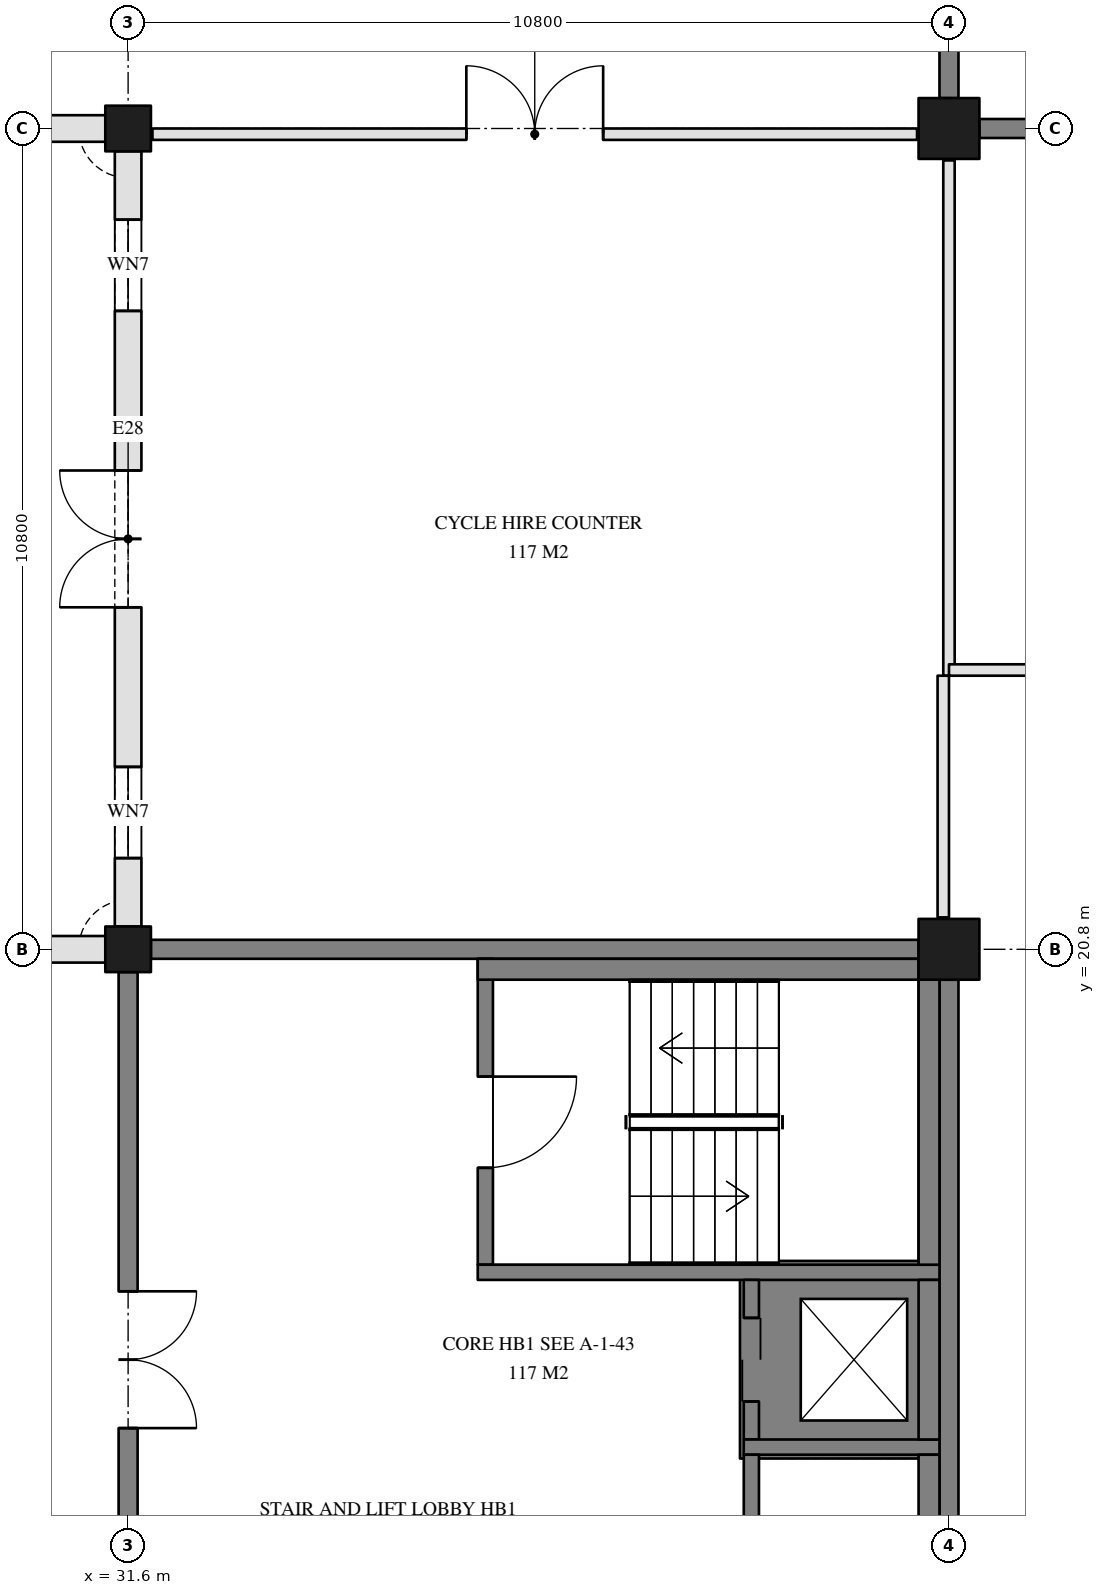
"""IFC4 building model, lengths in metres.
Left out: names, types, materials, properties, quantities, classifications, styles, units other than length and angle.
Written with IfcOpenShell. Run it as: python <this file> out.ifc"""

import sys

from ifc_helpers import new_model, si_unit, direction, frame, frame_2d, origin, origin_2d, place, context, subcontext, project, spatial, polyline, rectangle, outline, extrude, element, fill, save


model = new_model("IFC4")
c1 = context("Model", 3, precision=1e-05, world=origin(), true_north=direction((0.0, 1.0)))
c2 = subcontext(c1, "Body", "Model", "MODEL_VIEW")
j1 = project(units=[si_unit("LENGTHUNIT", "METRE"), si_unit("PLANEANGLEUNIT", "RADIAN")], contexts=[c1])
p1 = place(None, origin())
s1 = spatial("IfcSite", under=j1, at=p1, CompositionType="ELEMENT")
p2 = place(p1, origin())
s2 = spatial("IfcBuilding", under=s1, at=p2, CompositionType="ELEMENT")
p3 = place(p2, frame((0.0, 0.0, -5.4)))
s3 = spatial("IfcBuildingStorey", under=s2, at=p3, CompositionType="ELEMENT", Elevation=-5.4)
for number, where, z_axis, x_axis in (
    (1, (42.4, 20.8, -0.4), (0.0, 0.0, 1.0), (1.0, 0.0, 0.0)),
    (2, (42.4, 31.6, -0.4), (0.0, 0.0, 1.0), (1.0, 0.0, 0.0)),
):
    element("IfcColumn", number, at=place(p3, frame(where, z_axis=z_axis, x_axis=x_axis)), inside=s3, PredefinedType="COLUMN", context=c2, shape_type="SweptSolid", body=[
        extrude(rectangle(XDim=0.8, YDim=0.8, at=origin_2d()), origin(), (0.0, 0.0, 1.0), 5.8),
    ])
for number, where, z_axis, x_axis in (
    (3, (31.6, 20.8, -0.4), (0.0, 0.0, 1.0), (1.0, 0.0, 0.0)),
    (4, (31.6, 31.6, -0.4), (0.0, 0.0, 1.0), (1.0, 0.0, 0.0)),
):
    element("IfcColumn", number, at=place(p3, frame(where, z_axis=z_axis, x_axis=x_axis)), inside=s3, PredefinedType="COLUMN", context=c2, shape_type="SweptSolid", body=[
        extrude(rectangle(XDim=0.6, YDim=0.6, at=origin_2d()), origin(), (0.0, 0.0, 1.0), 5.8),
    ])
p4 = place(p3, frame((0.0, 0.0, -1.4)))
e5 = element("IfcWall", 5, at=p4, inside=s3, PredefinedType="SOLIDWALL", context=c2, shape_type="SweptSolid", body=[
    extrude(outline(polyline([(39.65, 16.7), (39.65, 14.1), (42.25, 14.1), (42.25, 16.7), (39.65, 16.7)]), holes=[polyline([(39.9, 14.35), (42.0, 14.35), (42.0, 16.45), (39.9, 16.45), (39.9, 14.35)])]), origin(), (0.0, 0.0, 1.0), 1.4),
])
p5 = place(p3, frame((42.8, 31.6, 0.0), z_axis=(0.0, 0.0, 1.0), x_axis=(1.0, 0.0, 0.0)))
e6 = element("IfcWall", 6, at=p5, inside=s3, PredefinedType="SOLIDWALL", context=c2, shape_type="SweptSolid", body=[
    extrude(rectangle(XDim=10.0, YDim=0.25, at=frame_2d((5.0, 0.0))), origin(), (0.0, 0.0, 1.0), 5.4),
])
p6 = place(p3, frame((42.4, 41.9, 0.0), z_axis=(0.0, 0.0, 1.0), x_axis=(0.0, -1.0, 0.0)))
e7 = element("IfcWall", 7, at=p6, inside=s3, PredefinedType="SOLIDWALL", context=c2, shape_type="SweptSolid", body=[
    extrude(rectangle(XDim=9.9, YDim=0.25, at=frame_2d((4.95, 0.0))), origin(), (0.0, 0.0, 1.0), 5.4),
])
p7 = place(p6, frame((6.638, 0.0, 0.0)))
e8 = element("IfcOpeningElement", 8, at=p7, cuts=e7, PredefinedType="OPENING", context=c2, shape_type="SweptSolid", body=[
    extrude(rectangle(XDim=1.8, YDim=2.1, at=frame_2d((0.9, 1.05))), frame((0.0, 0.135, 0.0), z_axis=(0.0, -1.0, 0.0), x_axis=(1.0, 0.0, 0.0)), (0.0, 0.0, 1.0), 0.27),
])
p8 = place(p3, frame((42.4, 10.4, 0.0), z_axis=(0.0, 0.0, 1.0), x_axis=(0.0, 1.0, 0.0)))
e9 = element("IfcWall", 9, at=p8, inside=s3, PredefinedType="SOLIDWALL", context=c2, shape_type="SweptSolid", body=[
    extrude(rectangle(XDim=10.0, YDim=0.25, at=frame_2d((5.0, 0.0))), origin(), (0.0, 0.0, 1.0), 5.4),
])
p9 = place(p3, frame((42.0, 20.8, 0.0), z_axis=(0.0, 0.0, 1.0), x_axis=(-1.0, 0.0, 0.0)))
e10 = element("IfcWall", 10, at=p9, inside=s3, PredefinedType="SOLIDWALL", context=c2, shape_type="SweptSolid", body=[
    extrude(rectangle(XDim=10.1, YDim=0.25, at=frame_2d((5.05, 0.0))), origin(), (0.0, 0.0, 1.0), 5.4),
])
p10 = place(p3, frame((31.6, 20.5, 0.0), z_axis=(0.0, 0.0, 1.0), x_axis=(0.0, -1.0, 0.0)))
e11 = element("IfcWall", 11, at=p10, inside=s3, PredefinedType="SOLIDWALL", context=c2, shape_type="SweptSolid", body=[
    extrude(rectangle(XDim=10.2, YDim=0.25, at=frame_2d((5.1, 0.0))), origin(), (0.0, 0.0, 1.0), 5.4),
])
p11 = place(p10, frame((4.2, 0.0, 0.0)))
e12 = element("IfcOpeningElement", 12, at=p11, cuts=e11, PredefinedType="OPENING", context=c2, shape_type="SweptSolid", body=[
    extrude(rectangle(XDim=1.8, YDim=2.1, at=frame_2d((0.9, 1.05))), frame((0.0, 0.135, 0.0), z_axis=(0.0, -1.0, 0.0), x_axis=(1.0, 0.0, 0.0)), (0.0, 0.0, 1.0), 0.27),
])
p12 = place(p3, frame((21.1, 20.8, 0.0), z_axis=(0.0, 0.0, 1.0), x_axis=(1.0, 0.0, 0.0)))
e13 = element("IfcWall", 13, at=p12, inside=s3, PredefinedType="SOLIDWALL", context=c2, shape_type="SweptSolid", body=[
    extrude(rectangle(XDim=10.2, YDim=0.35, at=frame_2d((5.1, 0.0))), origin(), (0.0, 0.0, 1.0), 3.6),
])
p13 = place(p12, frame((0.9, 0.0, 0.9)))
e14 = element("IfcOpeningElement", 14, at=p13, cuts=e13, PredefinedType="OPENING", context=c2, shape_type="SweptSolid", body=[
    extrude(rectangle(XDim=1.2, YDim=1.5, at=frame_2d((0.6, 0.75))), frame((0.0, 0.185, 0.0), z_axis=(0.0, -1.0, 0.0), x_axis=(1.0, 0.0, 0.0)), (0.0, 0.0, 1.0), 0.37),
])
p14 = place(p12, frame((4.2, 0.0, 0.0)))
e15 = element("IfcOpeningElement", 15, at=p14, cuts=e13, PredefinedType="OPENING", context=c2, shape_type="SweptSolid", body=[
    extrude(rectangle(XDim=1.8, YDim=2.4, at=frame_2d((0.9, 1.2))), frame((0.0, 0.185, 0.0), z_axis=(0.0, -1.0, 0.0), x_axis=(1.0, 0.0, 0.0)), (0.0, 0.0, 1.0), 0.37),
])
p15 = place(p12, frame((8.1, 0.0, 0.9)))
e16 = element("IfcOpeningElement", 16, at=p15, cuts=e13, PredefinedType="OPENING", context=c2, shape_type="SweptSolid", body=[
    extrude(rectangle(XDim=1.2, YDim=1.5, at=frame_2d((0.6, 0.75))), frame((0.0, 0.185, 0.0), z_axis=(0.0, -1.0, 0.0), x_axis=(1.0, 0.0, 0.0)), (0.0, 0.0, 1.0), 0.37),
])
p16 = place(p3, frame((21.1, 31.6, 0.0), z_axis=(0.0, 0.0, 1.0), x_axis=(1.0, 0.0, 0.0)))
e17 = element("IfcWall", 17, at=p16, inside=s3, PredefinedType="SOLIDWALL", context=c2, shape_type="SweptSolid", body=[
    extrude(rectangle(XDim=10.2, YDim=0.35, at=frame_2d((5.1, 0.0))), origin(), (0.0, 0.0, 1.0), 3.6),
])
p17 = place(p16, frame((0.9, 0.0, 0.9)))
e18 = element("IfcOpeningElement", 18, at=p17, cuts=e17, PredefinedType="OPENING", context=c2, shape_type="SweptSolid", body=[
    extrude(rectangle(XDim=1.2, YDim=1.5, at=frame_2d((0.6, 0.75))), frame((0.0, 0.185, 0.0), z_axis=(0.0, -1.0, 0.0), x_axis=(1.0, 0.0, 0.0)), (0.0, 0.0, 1.0), 0.37),
])
p18 = place(p16, frame((4.2, 0.0, 0.0)))
e19 = element("IfcOpeningElement", 19, at=p18, cuts=e17, PredefinedType="OPENING", context=c2, shape_type="SweptSolid", body=[
    extrude(rectangle(XDim=1.8, YDim=2.4, at=frame_2d((0.9, 1.2))), frame((0.0, 0.185, 0.0), z_axis=(0.0, -1.0, 0.0), x_axis=(1.0, 0.0, 0.0)), (0.0, 0.0, 1.0), 0.37),
])
p19 = place(p16, frame((8.1, 0.0, 0.9)))
e20 = element("IfcOpeningElement", 20, at=p19, cuts=e17, PredefinedType="OPENING", context=c2, shape_type="SweptSolid", body=[
    extrude(rectangle(XDim=1.2, YDim=1.5, at=frame_2d((0.6, 0.75))), frame((0.0, 0.185, 0.0), z_axis=(0.0, -1.0, 0.0), x_axis=(1.0, 0.0, 0.0)), (0.0, 0.0, 1.0), 0.37),
])
p20 = place(p3, frame((31.6, 21.1, 0.0), z_axis=(0.0, 0.0, 1.0), x_axis=(0.0, 1.0, 0.0)))
e21 = element("IfcWall", 21, at=p20, inside=s3, PredefinedType="SOLIDWALL", context=c2, shape_type="SweptSolid", body=[
    extrude(rectangle(XDim=10.2, YDim=0.35, at=frame_2d((5.1, 0.0))), origin(), (0.0, 0.0, 1.0), 3.6),
])
p21 = place(p20, frame((0.9, 0.0, 0.9)))
e22 = element("IfcOpeningElement", 22, at=p21, cuts=e21, PredefinedType="OPENING", context=c2, shape_type="SweptSolid", body=[
    extrude(rectangle(XDim=1.2, YDim=1.5, at=frame_2d((0.6, 0.75))), frame((0.0, 0.185, 0.0), z_axis=(0.0, -1.0, 0.0), x_axis=(1.0, 0.0, 0.0)), (0.0, 0.0, 1.0), 0.37),
])
p22 = place(p20, frame((4.2, 0.0, 0.0)))
e23 = element("IfcOpeningElement", 23, at=p22, cuts=e21, PredefinedType="OPENING", context=c2, shape_type="SweptSolid", body=[
    extrude(rectangle(XDim=1.8, YDim=2.4, at=frame_2d((0.9, 1.2))), frame((0.0, 0.185, 0.0), z_axis=(0.0, -1.0, 0.0), x_axis=(1.0, 0.0, 0.0)), (0.0, 0.0, 1.0), 0.37),
])
p23 = place(p20, frame((8.1, 0.0, 0.9)))
e24 = element("IfcOpeningElement", 24, at=p23, cuts=e21, PredefinedType="OPENING", context=c2, shape_type="SweptSolid", body=[
    extrude(rectangle(XDim=1.2, YDim=1.5, at=frame_2d((0.6, 0.75))), frame((0.0, 0.185, 0.0), z_axis=(0.0, -1.0, 0.0), x_axis=(1.0, 0.0, 0.0)), (0.0, 0.0, 1.0), 0.37),
])
p24 = place(p3, frame((36.3, 20.675, 0.0), z_axis=(0.0, 0.0, 1.0), x_axis=(0.0, -1.0, 0.0)))
e25 = element("IfcWall", 25, at=p24, inside=s3, PredefinedType="SOLIDWALL", context=c2, shape_type="SweptSolid", body=[
    extrude(rectangle(XDim=4.025, YDim=0.2, at=frame_2d((2.013, 0.0))), origin(), (0.0, 0.0, 1.0), 4.8),
])
p25 = place(p24, frame((1.55, 0.0, 0.0)))
e26 = element("IfcOpeningElement", 26, at=p25, cuts=e25, PredefinedType="OPENING", context=c2, shape_type="SweptSolid", body=[
    extrude(rectangle(XDim=1.2, YDim=2.1, at=frame_2d((0.6, 1.05))), frame((0.0, 0.11, 0.0), z_axis=(0.0, -1.0, 0.0), x_axis=(1.0, 0.0, 0.0)), (0.0, 0.0, 1.0), 0.22),
])
p26 = place(p3, frame((36.2, 16.55, 0.0), z_axis=(0.0, 0.0, 1.0), x_axis=(1.0, 0.0, 0.0)))
e27 = element("IfcWall", 27, at=p26, inside=s3, PredefinedType="SOLIDWALL", context=c2, shape_type="SweptSolid", body=[
    extrude(rectangle(XDim=6.075, YDim=0.2, at=frame_2d((3.038, 0.0))), origin(), (0.0, 0.0, 1.0), 4.8),
])
p27 = place(p3, frame((39.8, 16.45, 0.0), z_axis=(0.0, 0.0, 1.0), x_axis=(0.0, -1.0, 0.0)))
e28 = element("IfcWall", 28, at=p27, inside=s3, PredefinedType="SOLIDWALL", context=c2, shape_type="SweptSolid", body=[
    extrude(rectangle(XDim=2.1, YDim=0.2, at=frame_2d((1.05, 0.0))), origin(), (0.0, 0.0, 1.0), 4.8),
])
p28 = place(p27, frame((0.5, 0.0, 0.0)))
e29 = element("IfcOpeningElement", 29, at=p28, cuts=e28, PredefinedType="OPENING", context=c2, shape_type="SweptSolid", body=[
    extrude(rectangle(XDim=1.1, YDim=2.1, at=frame_2d((0.55, 1.05))), frame((0.0, 0.11, 0.0), z_axis=(0.0, -1.0, 0.0), x_axis=(1.0, 0.0, 0.0)), (0.0, 0.0, 1.0), 0.22),
])
p29 = place(p3, frame((39.7, 14.25, 0.0), z_axis=(0.0, 0.0, 1.0), x_axis=(1.0, 0.0, 0.0)))
e30 = element("IfcWall", 30, at=p29, inside=s3, PredefinedType="SOLIDWALL", context=c2, shape_type="SweptSolid", body=[
    extrude(rectangle(XDim=2.575, YDim=0.2, at=frame_2d((1.288, 0.0))), origin(), (0.0, 0.0, 1.0), 4.8),
])
p30 = place(p3, frame((39.8, 14.15, 0.0), z_axis=(0.0, 0.0, 1.0), x_axis=(0.0, -1.0, 0.0)))
e31 = element("IfcWall", 31, at=p30, inside=s3, PredefinedType="SOLIDWALL", context=c2, shape_type="SweptSolid", body=[
    extrude(rectangle(XDim=4.025, YDim=0.2, at=frame_2d((2.012, 0.0))), origin(), (0.0, 0.0, 1.0), 4.8),
])
p31 = place(p30, frame((1.425, 0.0, 0.0)))
e32 = element("IfcOpeningElement", 32, at=p31, cuts=e31, PredefinedType="OPENING", context=c2, shape_type="SweptSolid", body=[
    extrude(rectangle(XDim=0.9, YDim=2.1, at=frame_2d((0.45, 1.05))), frame((0.0, 0.11, 0.0), z_axis=(0.0, -1.0, 0.0), x_axis=(1.0, 0.0, 0.0)), (0.0, 0.0, 1.0), 0.22),
])
p32 = place(p3, frame((36.2, 20.538, 0.0), z_axis=(0.0, 0.0, 1.0), x_axis=(1.0, 0.0, 0.0)))
e33 = element("IfcWall", 33, at=p32, inside=s3, PredefinedType="SOLIDWALL", context=c2, shape_type="SweptSolid", body=[
    extrude(rectangle(XDim=6.075, YDim=0.275, at=frame_2d((3.038, 0.0))), origin(), (0.0, 0.0, 1.0), 4.8),
])
p33 = place(p3, frame((42.137, 20.675, 0.0), z_axis=(0.0, 0.0, 1.0), x_axis=(0.0, -1.0, 0.0)))
e34 = element("IfcWall", 34, at=p33, inside=s3, PredefinedType="SOLIDWALL", context=c2, shape_type="SweptSolid", body=[
    extrude(rectangle(XDim=4.025, YDim=0.275, at=frame_2d((2.013, 0.0))), origin(), (0.0, 0.0, 1.0), 4.8),
])
p34 = place(p3, frame((42.137, 16.45, 0.0), z_axis=(0.0, 0.0, 1.0), x_axis=(0.0, -1.0, 0.0)))
e35 = element("IfcWall", 35, at=p34, inside=s3, PredefinedType="SOLIDWALL", context=c2, shape_type="SweptSolid", body=[
    extrude(rectangle(XDim=2.1, YDim=0.275, at=frame_2d((1.05, 0.0))), origin(), (0.0, 0.0, 1.0), 4.8),
])
p35 = place(p3, frame((42.137, 14.15, 0.0), z_axis=(0.0, 0.0, 1.0), x_axis=(0.0, -1.0, 0.0)))
e36 = element("IfcWall", 36, at=p35, inside=s3, PredefinedType="SOLIDWALL", context=c2, shape_type="SweptSolid", body=[
    extrude(rectangle(XDim=4.025, YDim=0.275, at=frame_2d((2.012, 0.0))), origin(), (0.0, 0.0, 1.0), 4.8),
])
p36 = place(p3, frame((42.4, 24.4, 0.0), z_axis=(0.0, 0.0, 1.0), x_axis=(0.0, 1.0, 0.0)))
e37 = element("IfcWall", 37, at=p36, inside=s3, PredefinedType="PARTITIONING", context=c2, shape_type="SweptSolid", body=[
    extrude(rectangle(XDim=6.78, YDim=0.15, at=frame_2d((3.39, 0.0))), origin(), (0.0, 0.0, 1.0), 3.9),
])
p37 = place(p3, frame((42.4, 24.475, 0.0), z_axis=(0.0, 0.0, 1.0), x_axis=(1.0, 0.0, 0.0)))
e38 = element("IfcWall", 38, at=p37, inside=s3, PredefinedType="PARTITIONING", context=c2, shape_type="SweptSolid", body=[
    extrude(rectangle(XDim=10.8, YDim=0.15, at=frame_2d((5.4, 0.0))), origin(), (0.0, 0.0, 1.0), 3.8),
])
p38 = place(p37, frame((4.9, 0.0, 0.0)))
e39 = element("IfcOpeningElement", 39, at=p38, cuts=e38, PredefinedType="OPENING", context=c2, shape_type="SweptSolid", body=[
    extrude(rectangle(XDim=1.0, YDim=2.1, at=frame_2d((0.5, 1.05))), frame((0.0, 0.085, 0.0), z_axis=(0.0, -1.0, 0.0), x_axis=(1.0, 0.0, 0.0)), (0.0, 0.0, 1.0), 0.17),
])
p39 = place(p3, frame((42.325, 21.22, 0.0), z_axis=(0.0, 0.0, 1.0), x_axis=(0.0, 1.0, 0.0)))
e40 = element("IfcWall", 40, at=p39, inside=s3, PredefinedType="PARTITIONING", context=c2, shape_type="SweptSolid", body=[
    extrude(rectangle(XDim=3.18, YDim=0.15, at=frame_2d((1.59, 0.0))), origin(), (0.0, 0.0, 1.0), 3.9),
])
p40 = place(p3, frame((31.92, 31.525, 0.0), z_axis=(0.0, 0.0, 1.0), x_axis=(1.0, 0.0, 0.0)))
e41 = element("IfcWall", 41, at=p40, inside=s3, PredefinedType="PARTITIONING", context=c2, shape_type="SweptSolid", body=[
    extrude(rectangle(XDim=10.06, YDim=0.15, at=frame_2d((5.03, 0.0))), origin(), (0.0, 0.0, 1.0), 3.6),
])
p41 = place(p40, frame((4.13, 0.0, 0.0)))
e42 = element("IfcOpeningElement", 42, at=p41, cuts=e41, PredefinedType="OPENING", context=c2, shape_type="SweptSolid", body=[
    extrude(rectangle(XDim=1.8, YDim=2.1, at=frame_2d((0.9, 1.05))), frame((0.0, 0.085, 0.0), z_axis=(0.0, -1.0, 0.0), x_axis=(1.0, 0.0, 0.0)), (0.0, 0.0, 1.0), 0.17),
])
p42 = place(p21, origin())
e43 = element("IfcWindow", 43, at=p42, inside=s3, PartitioningType="SINGLE_PANEL", PredefinedType="WINDOW", context=c2, shape_type="SweptSolid", body=[
    extrude(rectangle(XDim=1.2, YDim=1.5, at=frame_2d((0.6, 0.75))), frame((0.0, 0.03, 0.0), z_axis=(0.0, -1.0, 0.0), x_axis=(1.0, 0.0, 0.0)), (0.0, 0.0, 1.0), 0.06),
])
fill(e22, e43)
p43 = place(p22, origin())
e44 = element("IfcDoor", 44, at=p43, inside=s3, OperationType="DOUBLE_DOOR_DOUBLE_SWING", PredefinedType="DOOR", context=c2, shape_type="SweptSolid", body=[
    extrude(rectangle(XDim=1.8, YDim=2.4, at=frame_2d((0.9, 1.2))), frame((0.0, 0.025, 0.0), z_axis=(0.0, -1.0, 0.0), x_axis=(1.0, 0.0, 0.0)), (0.0, 0.0, 1.0), 0.05),
])
fill(e23, e44)
p44 = place(p23, origin())
e45 = element("IfcWindow", 45, at=p44, inside=s3, PartitioningType="SINGLE_PANEL", PredefinedType="WINDOW", context=c2, shape_type="SweptSolid", body=[
    extrude(rectangle(XDim=1.2, YDim=1.5, at=frame_2d((0.6, 0.75))), frame((0.0, 0.03, 0.0), z_axis=(0.0, -1.0, 0.0), x_axis=(1.0, 0.0, 0.0)), (0.0, 0.0, 1.0), 0.06),
])
fill(e24, e45)
p45 = place(p28, frame((1.1, 0.0, 0.0), z_axis=(0.0, 0.0, 1.0), x_axis=(-1.0, 0.0, 0.0)))
e46 = element("IfcDoor", 46, at=p45, inside=s3, OperationType="DOUBLE_DOOR_SLIDING", PredefinedType="DOOR", context=c2, shape_type="SweptSolid", body=[
    extrude(rectangle(XDim=1.1, YDim=2.1, at=frame_2d((0.55, 1.05))), frame((0.0, 0.025, 0.0), z_axis=(0.0, -1.0, 0.0), x_axis=(1.0, 0.0, 0.0)), (0.0, 0.0, 1.0), 0.05),
])
fill(e29, e46)
p46 = place(p25, frame((1.2, 0.0, 0.0), z_axis=(0.0, 0.0, 1.0), x_axis=(-1.0, 0.0, 0.0)))
e47 = element("IfcDoor", 47, at=p46, inside=s3, OperationType="SINGLE_SWING_LEFT", PredefinedType="DOOR", context=c2, shape_type="SweptSolid", body=[
    extrude(rectangle(XDim=1.2, YDim=2.1, at=frame_2d((0.6, 1.05))), frame((0.0, 0.025, 0.0), z_axis=(0.0, -1.0, 0.0), x_axis=(1.0, 0.0, 0.0)), (0.0, 0.0, 1.0), 0.05),
])
fill(e26, e47)
p47 = place(p11, frame((1.8, 0.0, 0.0), z_axis=(0.0, 0.0, 1.0), x_axis=(-1.0, 0.0, 0.0)))
e48 = element("IfcDoor", 48, at=p47, inside=s3, OperationType="DOUBLE_DOOR_DOUBLE_SWING", PredefinedType="DOOR", context=c2, shape_type="SweptSolid", body=[
    extrude(rectangle(XDim=1.8, YDim=2.1, at=frame_2d((0.9, 1.05))), frame((0.0, 0.025, 0.0), z_axis=(0.0, -1.0, 0.0), x_axis=(1.0, 0.0, 0.0)), (0.0, 0.0, 1.0), 0.05),
])
fill(e12, e48)
p48 = place(p41, frame((1.8, 0.0, 0.0), z_axis=(0.0, 0.0, 1.0), x_axis=(-1.0, 0.0, 0.0)))
e49 = element("IfcDoor", 49, at=p48, inside=s3, OperationType="DOUBLE_DOOR_DOUBLE_SWING", PredefinedType="DOOR", context=c2, shape_type="SweptSolid", body=[
    extrude(rectangle(XDim=1.8, YDim=2.1, at=frame_2d((0.9, 1.05))), frame((0.0, 0.025, 0.0), z_axis=(0.0, -1.0, 0.0), x_axis=(1.0, 0.0, 0.0)), (0.0, 0.0, 1.0), 0.05),
])
fill(e42, e49)
save(model, sys.argv[1])
